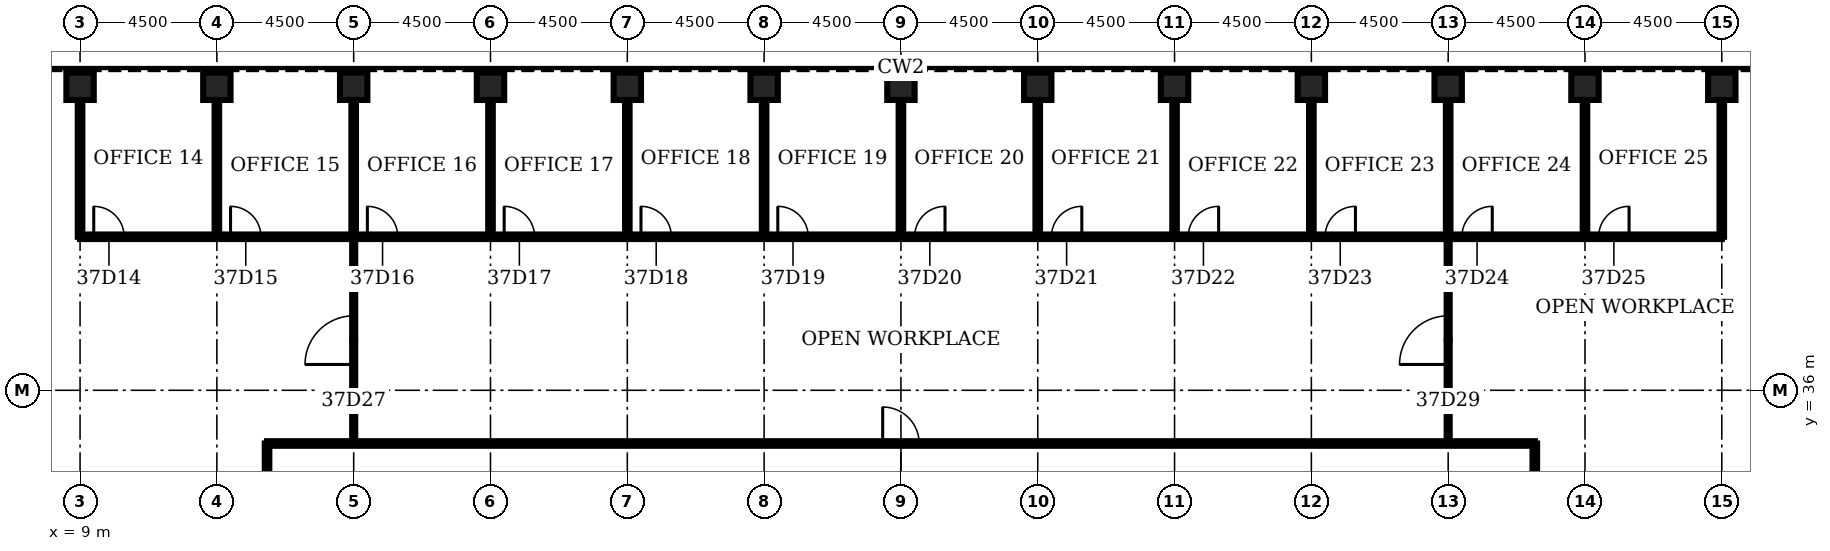
"""IFC4 building model, lengths in metres.
Left out: names, types, materials, properties, quantities, classifications, styles, units other than length and angle.
Written with IfcOpenShell. Run it as: python <this file> out.ifc"""

import sys

from ifc_helpers import new_model, si_unit, direction, frame, frame_2d, origin, origin_2d, place, context, subcontext, project, spatial, rectangle, hollow_rectangle, extrude, element, fill, save


model = new_model("IFC4")
c1 = context("Model", 3, precision=1e-05, world=origin(), true_north=direction((0.0, 1.0)))
c2 = subcontext(c1, "Body", "Model", "MODEL_VIEW")
j1 = project(units=[si_unit("LENGTHUNIT", "METRE"), si_unit("PLANEANGLEUNIT", "RADIAN")], contexts=[c1])
p1 = place(None, origin())
s1 = spatial("IfcSite", under=j1, at=p1, CompositionType="ELEMENT")
p2 = place(p1, origin())
s2 = spatial("IfcBuilding", under=s1, at=p2, CompositionType="ELEMENT")
p3 = place(p2, frame((0.0, 0.0, 167.7)))
s3 = spatial("IfcBuildingStorey", under=s2, at=p3, CompositionType="ELEMENT", Elevation=167.7)
for number, where, z_axis, x_axis in (
    (1, (63.0, 46.0, 0.0), (0.0, 0.0, 1.0), (0.0, 1.0, 0.0)),
    (2, (58.5, 46.0, 0.0), (0.0, 0.0, 1.0), (0.0, 1.0, 0.0)),
    (3, (54.0, 46.0, 0.0), (0.0, 0.0, 1.0), (0.0, 1.0, 0.0)),
    (4, (49.5, 46.0, 0.0), (0.0, 0.0, 1.0), (0.0, 1.0, 0.0)),
    (5, (45.0, 46.0, 0.0), (0.0, 0.0, 1.0), (0.0, 1.0, 0.0)),
    (6, (40.5, 46.0, 0.0), (0.0, 0.0, 1.0), (0.0, 1.0, 0.0)),
    (7, (36.0, 46.0, 0.0), (0.0, 0.0, 1.0), (0.0, 1.0, 0.0)),
    (8, (31.5, 46.0, 0.0), (0.0, 0.0, 1.0), (0.0, 1.0, 0.0)),
    (9, (27.0, 46.0, 0.0), (0.0, 0.0, 1.0), (0.0, 1.0, 0.0)),
    (10, (22.5, 46.0, 0.0), (0.0, 0.0, 1.0), (0.0, 1.0, 0.0)),
    (11, (18.0, 46.0, 0.0), (0.0, 0.0, 1.0), (0.0, 1.0, 0.0)),
    (12, (13.5, 46.0, 0.0), (0.0, 0.0, 1.0), (0.0, 1.0, 0.0)),
    (13, (9.0, 46.0, 0.0), (0.0, 0.0, 1.0), (0.0, 1.0, 0.0)),
):
    element("IfcColumn", number, at=place(p3, frame(where, z_axis=z_axis, x_axis=x_axis)), inside=s3, PredefinedType="COLUMN", context=c2, shape_type="SweptSolid", body=[
        extrude(hollow_rectangle(XDim=0.9, YDim=0.9, WallThickness=0.09, at=origin_2d()), origin(), (0.0, 0.0, 1.0), 4.2),
    ])
p4 = place(p3, frame((15.15, 34.25, 0.0), z_axis=(0.0, 0.0, 1.0), x_axis=(1.0, 0.0, 0.0)))
e14 = element("IfcWall", 14, at=p4, inside=s3, PredefinedType="PARTITIONING", context=c2, shape_type="SweptSolid", body=[
    extrude(rectangle(XDim=41.7, YDim=0.15, at=frame_2d((20.85, 0.0))), origin(), (0.0, 0.0, 1.0), 3.0),
])
p5 = place(p4, frame((20.25, 0.0, 0.0)))
e15 = element("IfcOpeningElement", 15, at=p5, cuts=e14, PredefinedType="OPENING", context=c2, shape_type="SweptSolid", body=[
    extrude(rectangle(XDim=1.2, YDim=2.1, at=frame_2d((0.6, 1.05))), frame((0.0, 0.085, 0.0), z_axis=(0.0, -1.0, 0.0), x_axis=(1.0, 0.0, 0.0)), (0.0, 0.0, 1.0), 0.17),
])
p6 = place(p3, frame((9.0, 41.05, 0.0), z_axis=(0.0, 0.0, 1.0), x_axis=(1.0, 0.0, 0.0)))
e16 = element("IfcWall", 16, at=p6, inside=s3, PredefinedType="PARTITIONING", context=c2, shape_type="SweptSolid", body=[
    extrude(rectangle(XDim=54.0, YDim=0.15, at=frame_2d((27.0, 0.0))), origin(), (0.0, 0.0, 1.0), 3.0),
])
p7 = place(p6, frame((0.45, 0.0, 0.0)))
e17 = element("IfcOpeningElement", 17, at=p7, cuts=e16, PredefinedType="OPENING", context=c2, shape_type="SweptSolid", body=[
    extrude(rectangle(XDim=1.0, YDim=2.1, at=frame_2d((0.5, 1.05))), frame((0.0, 0.085, 0.0), z_axis=(0.0, -1.0, 0.0), x_axis=(1.0, 0.0, 0.0)), (0.0, 0.0, 1.0), 0.17),
])
p8 = place(p6, frame((4.95, 0.0, 0.0)))
e18 = element("IfcOpeningElement", 18, at=p8, cuts=e16, PredefinedType="OPENING", context=c2, shape_type="SweptSolid", body=[
    extrude(rectangle(XDim=1.0, YDim=2.1, at=frame_2d((0.5, 1.05))), frame((0.0, 0.085, 0.0), z_axis=(0.0, -1.0, 0.0), x_axis=(1.0, 0.0, 0.0)), (0.0, 0.0, 1.0), 0.17),
])
p9 = place(p6, frame((9.45, 0.0, 0.0)))
e19 = element("IfcOpeningElement", 19, at=p9, cuts=e16, PredefinedType="OPENING", context=c2, shape_type="SweptSolid", body=[
    extrude(rectangle(XDim=1.0, YDim=2.1, at=frame_2d((0.5, 1.05))), frame((0.0, 0.085, 0.0), z_axis=(0.0, -1.0, 0.0), x_axis=(1.0, 0.0, 0.0)), (0.0, 0.0, 1.0), 0.17),
])
p10 = place(p6, frame((13.95, 0.0, 0.0)))
e20 = element("IfcOpeningElement", 20, at=p10, cuts=e16, PredefinedType="OPENING", context=c2, shape_type="SweptSolid", body=[
    extrude(rectangle(XDim=1.0, YDim=2.1, at=frame_2d((0.5, 1.05))), frame((0.0, 0.085, 0.0), z_axis=(0.0, -1.0, 0.0), x_axis=(1.0, 0.0, 0.0)), (0.0, 0.0, 1.0), 0.17),
])
p11 = place(p6, frame((18.45, 0.0, 0.0)))
e21 = element("IfcOpeningElement", 21, at=p11, cuts=e16, PredefinedType="OPENING", context=c2, shape_type="SweptSolid", body=[
    extrude(rectangle(XDim=1.0, YDim=2.1, at=frame_2d((0.5, 1.05))), frame((0.0, 0.085, 0.0), z_axis=(0.0, -1.0, 0.0), x_axis=(1.0, 0.0, 0.0)), (0.0, 0.0, 1.0), 0.17),
])
p12 = place(p6, frame((22.95, 0.0, 0.0)))
e22 = element("IfcOpeningElement", 22, at=p12, cuts=e16, PredefinedType="OPENING", context=c2, shape_type="SweptSolid", body=[
    extrude(rectangle(XDim=1.0, YDim=2.1, at=frame_2d((0.5, 1.05))), frame((0.0, 0.085, 0.0), z_axis=(0.0, -1.0, 0.0), x_axis=(1.0, 0.0, 0.0)), (0.0, 0.0, 1.0), 0.17),
])
p13 = place(p6, frame((27.45, 0.0, 0.0)))
e23 = element("IfcOpeningElement", 23, at=p13, cuts=e16, PredefinedType="OPENING", context=c2, shape_type="SweptSolid", body=[
    extrude(rectangle(XDim=1.0, YDim=2.1, at=frame_2d((0.5, 1.05))), frame((0.0, 0.085, 0.0), z_axis=(0.0, -1.0, 0.0), x_axis=(1.0, 0.0, 0.0)), (0.0, 0.0, 1.0), 0.17),
])
p14 = place(p6, frame((31.95, 0.0, 0.0)))
e24 = element("IfcOpeningElement", 24, at=p14, cuts=e16, PredefinedType="OPENING", context=c2, shape_type="SweptSolid", body=[
    extrude(rectangle(XDim=1.0, YDim=2.1, at=frame_2d((0.5, 1.05))), frame((0.0, 0.085, 0.0), z_axis=(0.0, -1.0, 0.0), x_axis=(1.0, 0.0, 0.0)), (0.0, 0.0, 1.0), 0.17),
])
p15 = place(p6, frame((36.45, 0.0, 0.0)))
e25 = element("IfcOpeningElement", 25, at=p15, cuts=e16, PredefinedType="OPENING", context=c2, shape_type="SweptSolid", body=[
    extrude(rectangle(XDim=1.0, YDim=2.1, at=frame_2d((0.5, 1.05))), frame((0.0, 0.085, 0.0), z_axis=(0.0, -1.0, 0.0), x_axis=(1.0, 0.0, 0.0)), (0.0, 0.0, 1.0), 0.17),
])
p16 = place(p6, frame((40.95, 0.0, 0.0)))
e26 = element("IfcOpeningElement", 26, at=p16, cuts=e16, PredefinedType="OPENING", context=c2, shape_type="SweptSolid", body=[
    extrude(rectangle(XDim=1.0, YDim=2.1, at=frame_2d((0.5, 1.05))), frame((0.0, 0.085, 0.0), z_axis=(0.0, -1.0, 0.0), x_axis=(1.0, 0.0, 0.0)), (0.0, 0.0, 1.0), 0.17),
])
p17 = place(p6, frame((45.45, 0.0, 0.0)))
e27 = element("IfcOpeningElement", 27, at=p17, cuts=e16, PredefinedType="OPENING", context=c2, shape_type="SweptSolid", body=[
    extrude(rectangle(XDim=1.0, YDim=2.1, at=frame_2d((0.5, 1.05))), frame((0.0, 0.085, 0.0), z_axis=(0.0, -1.0, 0.0), x_axis=(1.0, 0.0, 0.0)), (0.0, 0.0, 1.0), 0.17),
])
p18 = place(p6, frame((49.95, 0.0, 0.0)))
e28 = element("IfcOpeningElement", 28, at=p18, cuts=e16, PredefinedType="OPENING", context=c2, shape_type="SweptSolid", body=[
    extrude(rectangle(XDim=1.0, YDim=2.1, at=frame_2d((0.5, 1.05))), frame((0.0, 0.085, 0.0), z_axis=(0.0, -1.0, 0.0), x_axis=(1.0, 0.0, 0.0)), (0.0, 0.0, 1.0), 0.17),
])
for number, where, z_axis, x_axis in (
    (29, (9.0, 41.05, 0.0), (0.0, 0.0, 1.0), (0.0, 1.0, 0.0)),
    (30, (13.5, 41.05, 0.0), (0.0, 0.0, 1.0), (0.0, 1.0, 0.0)),
):
    element("IfcWall", number, at=place(p3, frame(where, z_axis=z_axis, x_axis=x_axis)), inside=s3, PredefinedType="PARTITIONING", context=c2, shape_type="SweptSolid", body=[
        extrude(rectangle(XDim=4.5, YDim=0.15, at=frame_2d((2.25, 0.0))), origin(), (0.0, 0.0, 1.0), 3.0),
    ])
p19 = place(p3, frame((15.15, 13.75, 0.0), z_axis=(0.0, 0.0, 1.0), x_axis=(0.0, 1.0, 0.0)))
e31 = element("IfcWall", 31, at=p19, inside=s3, PredefinedType="PARTITIONING", context=c2, shape_type="SweptSolid", body=[
    extrude(rectangle(XDim=20.5, YDim=0.15, at=frame_2d((10.25, 0.0))), origin(), (0.0, 0.0, 1.0), 3.0),
])
p20 = place(p19, frame((9.65, 0.0, 0.0)))
e32 = element("IfcOpeningElement", 32, at=p20, cuts=e31, PredefinedType="OPENING", context=c2, shape_type="SweptSolid", body=[
    extrude(rectangle(XDim=1.2, YDim=2.1, at=frame_2d((0.6, 1.05))), frame((0.0, 0.085, 0.0), z_axis=(0.0, -1.0, 0.0), x_axis=(1.0, 0.0, 0.0)), (0.0, 0.0, 1.0), 0.17),
])
p21 = place(p3, frame((18.0, 34.25, 0.0), z_axis=(0.0, 0.0, 1.0), x_axis=(0.0, 1.0, 0.0)))
e33 = element("IfcWall", 33, at=p21, inside=s3, PredefinedType="PARTITIONING", context=c2, shape_type="SweptSolid", body=[
    extrude(rectangle(XDim=6.8, YDim=0.1, at=frame_2d((3.4, 0.0))), origin(), (0.0, 0.0, 1.0), 3.0),
])
p22 = place(p21, frame((2.6, 0.0, 0.0)))
e34 = element("IfcOpeningElement", 34, at=p22, cuts=e33, PredefinedType="OPENING", context=c2, shape_type="SweptSolid", body=[
    extrude(rectangle(XDim=1.6, YDim=2.1, at=frame_2d((0.8, 1.05))), frame((0.0, 0.06, 0.0), z_axis=(0.0, -1.0, 0.0), x_axis=(1.0, 0.0, 0.0)), (0.0, 0.0, 1.0), 0.12),
])
for number, where, z_axis, x_axis in (
    (35, (18.0, 41.05, 0.0), (0.0, 0.0, 1.0), (0.0, 1.0, 0.0)),
    (36, (22.5, 41.05, 0.0), (0.0, 0.0, 1.0), (0.0, 1.0, 0.0)),
    (37, (27.0, 41.05, 0.0), (0.0, 0.0, 1.0), (0.0, 1.0, 0.0)),
    (38, (31.5, 41.05, 0.0), (0.0, 0.0, 1.0), (0.0, 1.0, 0.0)),
    (39, (36.0, 41.05, 0.0), (0.0, 0.0, 1.0), (0.0, 1.0, 0.0)),
    (40, (40.5, 41.05, 0.0), (0.0, 0.0, 1.0), (0.0, 1.0, 0.0)),
    (41, (45.0, 41.05, 0.0), (0.0, 0.0, 1.0), (0.0, 1.0, 0.0)),
    (42, (49.5, 41.05, 0.0), (0.0, 0.0, 1.0), (0.0, 1.0, 0.0)),
):
    element("IfcWall", number, at=place(p3, frame(where, z_axis=z_axis, x_axis=x_axis)), inside=s3, PredefinedType="PARTITIONING", context=c2, shape_type="SweptSolid", body=[
        extrude(rectangle(XDim=4.5, YDim=0.15, at=frame_2d((2.25, 0.0))), origin(), (0.0, 0.0, 1.0), 3.0),
    ])
p23 = place(p3, frame((54.0, 34.25, 0.0), z_axis=(0.0, 0.0, 1.0), x_axis=(0.0, 1.0, 0.0)))
e43 = element("IfcWall", 43, at=p23, inside=s3, PredefinedType="PARTITIONING", context=c2, shape_type="SweptSolid", body=[
    extrude(rectangle(XDim=6.8, YDim=0.1, at=frame_2d((3.4, 0.0))), origin(), (0.0, 0.0, 1.0), 3.0),
])
p24 = place(p23, frame((2.6, 0.0, 0.0)))
e44 = element("IfcOpeningElement", 44, at=p24, cuts=e43, PredefinedType="OPENING", context=c2, shape_type="SweptSolid", body=[
    extrude(rectangle(XDim=1.6, YDim=2.1, at=frame_2d((0.8, 1.05))), frame((0.0, 0.06, 0.0), z_axis=(0.0, -1.0, 0.0), x_axis=(1.0, 0.0, 0.0)), (0.0, 0.0, 1.0), 0.12),
])
p25 = place(p3, frame((54.0, 41.05, 0.0), z_axis=(0.0, 0.0, 1.0), x_axis=(0.0, 1.0, 0.0)))
e45 = element("IfcWall", 45, at=p25, inside=s3, PredefinedType="PARTITIONING", context=c2, shape_type="SweptSolid", body=[
    extrude(rectangle(XDim=4.5, YDim=0.15, at=frame_2d((2.25, 0.0))), origin(), (0.0, 0.0, 1.0), 3.0),
])
p26 = place(p3, frame((56.85, 13.75, 0.0), z_axis=(0.0, 0.0, 1.0), x_axis=(0.0, 1.0, 0.0)))
e46 = element("IfcWall", 46, at=p26, inside=s3, PredefinedType="PARTITIONING", context=c2, shape_type="SweptSolid", body=[
    extrude(rectangle(XDim=20.5, YDim=0.15, at=frame_2d((10.25, 0.0))), origin(), (0.0, 0.0, 1.0), 3.0),
])
p27 = place(p26, frame((9.65, 0.0, 0.0)))
e47 = element("IfcOpeningElement", 47, at=p27, cuts=e46, PredefinedType="OPENING", context=c2, shape_type="SweptSolid", body=[
    extrude(rectangle(XDim=1.2, YDim=2.1, at=frame_2d((0.6, 1.05))), frame((0.0, 0.085, 0.0), z_axis=(0.0, -1.0, 0.0), x_axis=(1.0, 0.0, 0.0)), (0.0, 0.0, 1.0), 0.17),
])
for number, where, z_axis, x_axis in (
    (48, (58.5, 41.05, 0.0), (0.0, 0.0, 1.0), (0.0, 1.0, 0.0)),
    (49, (63.0, 41.05, 0.0), (0.0, 0.0, 1.0), (0.0, 1.0, 0.0)),
):
    element("IfcWall", number, at=place(p3, frame(where, z_axis=z_axis, x_axis=x_axis)), inside=s3, PredefinedType="PARTITIONING", context=c2, shape_type="SweptSolid", body=[
        extrude(rectangle(XDim=4.5, YDim=0.15, at=frame_2d((2.25, 0.0))), origin(), (0.0, 0.0, 1.0), 3.0),
    ])
p28 = place(p7, origin())
e50 = element("IfcDoor", 50, at=p28, inside=s3, OperationType="SINGLE_SWING_LEFT", PredefinedType="DOOR", context=c2, shape_type="SweptSolid", body=[
    extrude(rectangle(XDim=1.0, YDim=2.1, at=frame_2d((0.5, 1.05))), frame((0.0, 0.025, 0.0), z_axis=(0.0, -1.0, 0.0), x_axis=(1.0, 0.0, 0.0)), (0.0, 0.0, 1.0), 0.05),
])
fill(e17, e50)
p29 = place(p8, origin())
e51 = element("IfcDoor", 51, at=p29, inside=s3, OperationType="SINGLE_SWING_LEFT", PredefinedType="DOOR", context=c2, shape_type="SweptSolid", body=[
    extrude(rectangle(XDim=1.0, YDim=2.1, at=frame_2d((0.5, 1.05))), frame((0.0, 0.025, 0.0), z_axis=(0.0, -1.0, 0.0), x_axis=(1.0, 0.0, 0.0)), (0.0, 0.0, 1.0), 0.05),
])
fill(e18, e51)
p30 = place(p9, origin())
e52 = element("IfcDoor", 52, at=p30, inside=s3, OperationType="SINGLE_SWING_LEFT", PredefinedType="DOOR", context=c2, shape_type="SweptSolid", body=[
    extrude(rectangle(XDim=1.0, YDim=2.1, at=frame_2d((0.5, 1.05))), frame((0.0, 0.025, 0.0), z_axis=(0.0, -1.0, 0.0), x_axis=(1.0, 0.0, 0.0)), (0.0, 0.0, 1.0), 0.05),
])
fill(e19, e52)
p31 = place(p10, origin())
e53 = element("IfcDoor", 53, at=p31, inside=s3, OperationType="SINGLE_SWING_LEFT", PredefinedType="DOOR", context=c2, shape_type="SweptSolid", body=[
    extrude(rectangle(XDim=1.0, YDim=2.1, at=frame_2d((0.5, 1.05))), frame((0.0, 0.025, 0.0), z_axis=(0.0, -1.0, 0.0), x_axis=(1.0, 0.0, 0.0)), (0.0, 0.0, 1.0), 0.05),
])
fill(e20, e53)
p32 = place(p11, origin())
e54 = element("IfcDoor", 54, at=p32, inside=s3, OperationType="SINGLE_SWING_LEFT", PredefinedType="DOOR", context=c2, shape_type="SweptSolid", body=[
    extrude(rectangle(XDim=1.0, YDim=2.1, at=frame_2d((0.5, 1.05))), frame((0.0, 0.025, 0.0), z_axis=(0.0, -1.0, 0.0), x_axis=(1.0, 0.0, 0.0)), (0.0, 0.0, 1.0), 0.05),
])
fill(e21, e54)
p33 = place(p12, origin())
e55 = element("IfcDoor", 55, at=p33, inside=s3, OperationType="SINGLE_SWING_LEFT", PredefinedType="DOOR", context=c2, shape_type="SweptSolid", body=[
    extrude(rectangle(XDim=1.0, YDim=2.1, at=frame_2d((0.5, 1.05))), frame((0.0, 0.025, 0.0), z_axis=(0.0, -1.0, 0.0), x_axis=(1.0, 0.0, 0.0)), (0.0, 0.0, 1.0), 0.05),
])
fill(e22, e55)
p34 = place(p13, origin())
e56 = element("IfcDoor", 56, at=p34, inside=s3, OperationType="SINGLE_SWING_RIGHT", PredefinedType="DOOR", context=c2, shape_type="SweptSolid", body=[
    extrude(rectangle(XDim=1.0, YDim=2.1, at=frame_2d((0.5, 1.05))), frame((0.0, 0.025, 0.0), z_axis=(0.0, -1.0, 0.0), x_axis=(1.0, 0.0, 0.0)), (0.0, 0.0, 1.0), 0.05),
])
fill(e23, e56)
p35 = place(p14, origin())
e57 = element("IfcDoor", 57, at=p35, inside=s3, OperationType="SINGLE_SWING_RIGHT", PredefinedType="DOOR", context=c2, shape_type="SweptSolid", body=[
    extrude(rectangle(XDim=1.0, YDim=2.1, at=frame_2d((0.5, 1.05))), frame((0.0, 0.025, 0.0), z_axis=(0.0, -1.0, 0.0), x_axis=(1.0, 0.0, 0.0)), (0.0, 0.0, 1.0), 0.05),
])
fill(e24, e57)
p36 = place(p15, origin())
e58 = element("IfcDoor", 58, at=p36, inside=s3, OperationType="SINGLE_SWING_RIGHT", PredefinedType="DOOR", context=c2, shape_type="SweptSolid", body=[
    extrude(rectangle(XDim=1.0, YDim=2.1, at=frame_2d((0.5, 1.05))), frame((0.0, 0.025, 0.0), z_axis=(0.0, -1.0, 0.0), x_axis=(1.0, 0.0, 0.0)), (0.0, 0.0, 1.0), 0.05),
])
fill(e25, e58)
p37 = place(p16, origin())
e59 = element("IfcDoor", 59, at=p37, inside=s3, OperationType="SINGLE_SWING_RIGHT", PredefinedType="DOOR", context=c2, shape_type="SweptSolid", body=[
    extrude(rectangle(XDim=1.0, YDim=2.1, at=frame_2d((0.5, 1.05))), frame((0.0, 0.025, 0.0), z_axis=(0.0, -1.0, 0.0), x_axis=(1.0, 0.0, 0.0)), (0.0, 0.0, 1.0), 0.05),
])
fill(e26, e59)
p38 = place(p17, origin())
e60 = element("IfcDoor", 60, at=p38, inside=s3, OperationType="SINGLE_SWING_RIGHT", PredefinedType="DOOR", context=c2, shape_type="SweptSolid", body=[
    extrude(rectangle(XDim=1.0, YDim=2.1, at=frame_2d((0.5, 1.05))), frame((0.0, 0.025, 0.0), z_axis=(0.0, -1.0, 0.0), x_axis=(1.0, 0.0, 0.0)), (0.0, 0.0, 1.0), 0.05),
])
fill(e27, e60)
p39 = place(p18, origin())
e61 = element("IfcDoor", 61, at=p39, inside=s3, OperationType="SINGLE_SWING_RIGHT", PredefinedType="DOOR", context=c2, shape_type="SweptSolid", body=[
    extrude(rectangle(XDim=1.0, YDim=2.1, at=frame_2d((0.5, 1.05))), frame((0.0, 0.025, 0.0), z_axis=(0.0, -1.0, 0.0), x_axis=(1.0, 0.0, 0.0)), (0.0, 0.0, 1.0), 0.05),
])
fill(e28, e61)
p40 = place(p22, origin())
e62 = element("IfcDoor", 62, at=p40, inside=s3, OperationType="SINGLE_SWING_LEFT", PredefinedType="DOOR", context=c2, shape_type="SweptSolid", body=[
    extrude(rectangle(XDim=1.6, YDim=2.1, at=frame_2d((0.8, 1.05))), frame((0.0, 0.025, 0.0), z_axis=(0.0, -1.0, 0.0), x_axis=(1.0, 0.0, 0.0)), (0.0, 0.0, 1.0), 0.05),
])
fill(e34, e62)
p41 = place(p24, origin())
e63 = element("IfcDoor", 63, at=p41, inside=s3, OperationType="SINGLE_SWING_LEFT", PredefinedType="DOOR", context=c2, shape_type="SweptSolid", body=[
    extrude(rectangle(XDim=1.6, YDim=2.1, at=frame_2d((0.8, 1.05))), frame((0.0, 0.025, 0.0), z_axis=(0.0, -1.0, 0.0), x_axis=(1.0, 0.0, 0.0)), (0.0, 0.0, 1.0), 0.05),
])
fill(e44, e63)
p42 = place(p5, origin())
e64 = element("IfcDoor", 64, at=p42, inside=s3, OperationType="SINGLE_SWING_LEFT", PredefinedType="DOOR", context=c2, shape_type="SweptSolid", body=[
    extrude(rectangle(XDim=1.2, YDim=2.1, at=frame_2d((0.6, 1.05))), frame((0.0, 0.025, 0.0), z_axis=(0.0, -1.0, 0.0), x_axis=(1.0, 0.0, 0.0)), (0.0, 0.0, 1.0), 0.05),
])
fill(e15, e64)
save(model, sys.argv[1])
